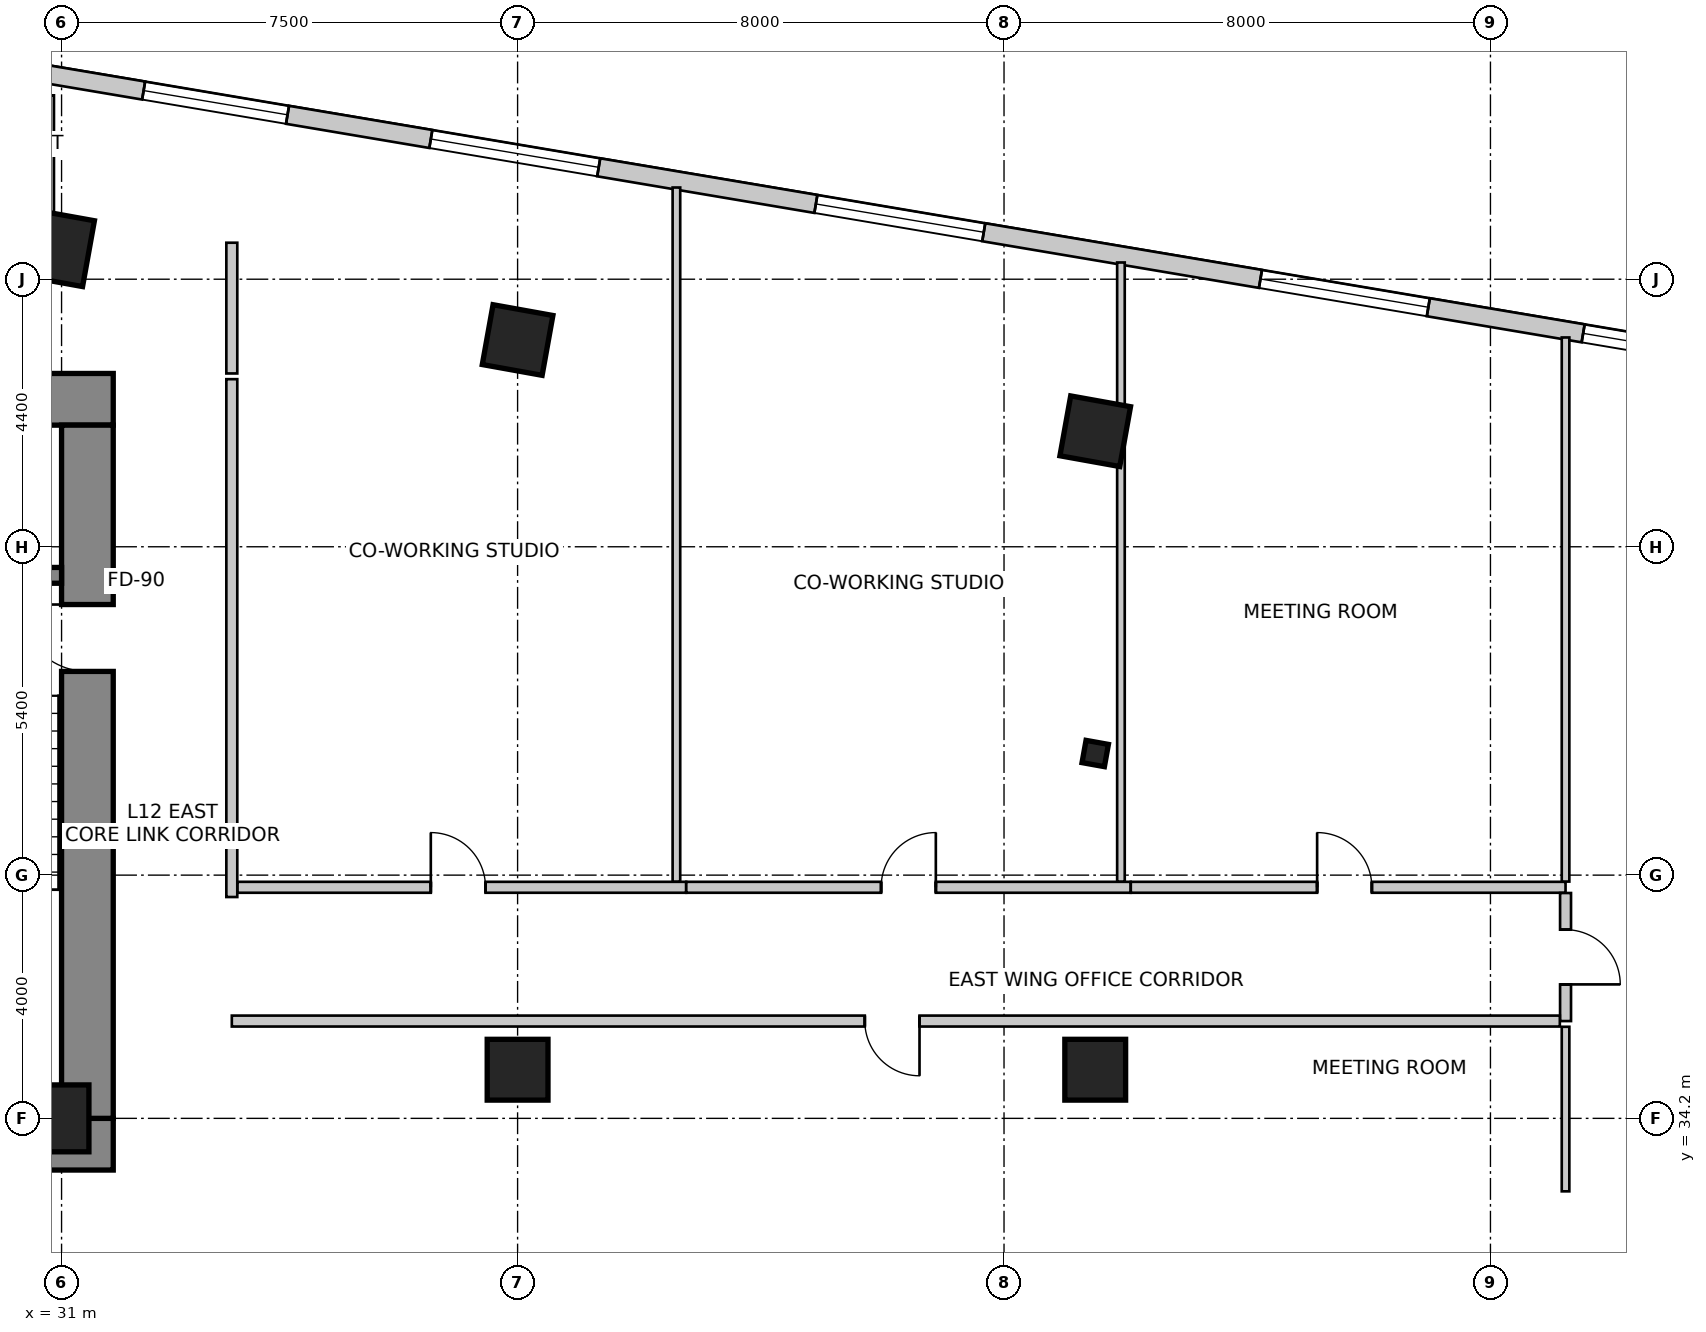
"""IFC4 building model, lengths in metres.
Left out: names, types, materials, properties, quantities, classifications, styles, units other than length and angle.
Written with IfcOpenShell. Run it as: python <this file> out.ifc"""

import sys

from ifc_helpers import new_model, si_unit, direction, frame, frame_2d, origin, origin_2d, place, context, subcontext, project, spatial, rectangle, i_section, extrude, source, transform, mapped, element, fill, save


model = new_model("IFC4")
c1 = context("Model", 3, precision=1e-05, world=origin(), true_north=direction((0.0, 1.0)))
c2 = subcontext(c1, "Body", "Model", "MODEL_VIEW")
j1 = project(units=[si_unit("LENGTHUNIT", "METRE"), si_unit("PLANEANGLEUNIT", "RADIAN")], contexts=[c1])
p1 = place(None, origin())
s1 = spatial("IfcSite", under=j1, at=p1, CompositionType="ELEMENT")
p2 = place(p1, origin())
s2 = spatial("IfcBuilding", under=s1, at=p2, CompositionType="ELEMENT")
p3 = place(p2, frame((0.0, 0.0, 51.0)))
s3 = spatial("IfcBuildingStorey", under=s2, at=p3, CompositionType="ELEMENT", Elevation=51.0)
p4 = place(p3, frame((15.75, 46.025, 0.0), z_axis=(0.0, 0.0, 1.0), x_axis=(1.0, 0.0, 0.0)))
e1 = element("IfcWall", 1, at=p4, inside=s3, PredefinedType="SHEAR", context=c2, shape_type="SweptSolid", body=[
    extrude(rectangle(XDim=16.1, YDim=0.85, at=frame_2d((8.05, 0.0))), origin(), (0.0, 0.0, 1.0), 4.0),
])
p5 = place(p3, frame((15.75, 33.775, 0.0), z_axis=(0.0, 0.0, 1.0), x_axis=(1.0, 0.0, 0.0)))
e2 = element("IfcWall", 2, at=p5, inside=s3, PredefinedType="SHEAR", context=c2, shape_type="SweptSolid", body=[
    extrude(rectangle(XDim=16.1, YDim=0.85, at=frame_2d((8.05, 0.0))), origin(), (0.0, 0.0, 1.0), 4.0),
])
m1 = source(origin(), c2, "Body", "SweptSolid", [
    extrude(rectangle(XDim=1.3, YDim=2.15, at=frame_2d((0.65, 1.075))), frame((0.0, 0.435, 0.0), z_axis=(0.0, -1.0, 0.0), x_axis=(1.0, 0.0, 0.0)), (0.0, 0.0, 1.0), 0.87),
])
p6 = place(p5, frame((10.18, 0.0, 0.0)))
e3 = element("IfcOpeningElement", 3, at=p6, cuts=e2, PredefinedType="OPENING", context=c2, shape_type="MappedRepresentation", body=[
    mapped(m1, transform((0.0, 0.0, 0.0), scale=1.0)),
])
p7 = place(p3, frame((31.425, 34.2, 0.0), z_axis=(0.0, 0.0, 1.0), x_axis=(0.0, 1.0, 0.0)))
e4 = element("IfcWall", 4, at=p7, inside=s3, PredefinedType="SHEAR", context=c2, shape_type="SweptSolid", body=[
    extrude(rectangle(XDim=11.4, YDim=0.85, at=frame_2d((5.7, 0.0))), origin(), (0.0, 0.0, 1.0), 4.0),
])
m2 = source(origin(), c2, "Body", "SweptSolid", [
    extrude(rectangle(XDim=1.1, YDim=2.15, at=frame_2d((0.55, 1.075))), frame((0.0, 0.435, 0.0), z_axis=(0.0, -1.0, 0.0), x_axis=(1.0, 0.0, 0.0)), (0.0, 0.0, 1.0), 0.87),
])
p8 = place(p7, frame((7.35, 0.0, 0.0)))
e5 = element("IfcOpeningElement", 5, at=p8, cuts=e4, PredefinedType="OPENING", context=c2, shape_type="MappedRepresentation", body=[
    mapped(m2, transform((0.0, 0.0, 0.0), scale=1.0)),
])
p9 = place(p3, frame((27.5, 43.13, 0.0), z_axis=(0.0, 0.0, 1.0), x_axis=(1.0, 0.0, 0.0)))
e6 = element("IfcWall", 6, at=p9, inside=s3, PredefinedType="SHEAR", context=c2, shape_type="SweptSolid", body=[
    extrude(rectangle(XDim=3.5, YDim=0.26, at=frame_2d((1.75, 0.0))), origin(), (0.0, 0.0, 1.0), 4.0),
])
m3 = source(origin(), c2, "Body", "SweptSolid", [
    extrude(rectangle(XDim=0.9, YDim=1.1, at=origin_2d()), origin(), (0.0, 0.0, 1.0), 4.0),
])
p10 = place(p3, frame((31.0, 48.5, 0.0), z_axis=(0.0, 0.0, 1.0), x_axis=(0.984195607969, -0.17708474032, 0.0)))
e7 = element("IfcColumn", 7, at=p10, inside=s3, PredefinedType="COLUMN", context=c2, shape_type="MappedRepresentation", body=[
    mapped(m3, transform((0.0, 0.0, 0.0), scale=1.0)),
])
m4 = source(origin(), c2, "Body", "SweptSolid", [
    extrude(rectangle(XDim=1.0, YDim=1.0, at=origin_2d()), origin(), (0.0, 0.0, 1.0), 4.0),
])
for number, where, z_axis, x_axis in (
    (8, (38.5, 47.0, 0.0), (0.0, 0.0, 1.0), (0.984, -0.177, 0.0)),
    (9, (48.0, 45.5, 0.0), (0.0, 0.0, 1.0), (0.984, -0.177, 0.0)),
):
    element("IfcColumn", number, at=place(p3, frame(where, z_axis=z_axis, x_axis=x_axis)), inside=s3, PredefinedType="COLUMN", context=c2, shape_type="MappedRepresentation", body=[
        mapped(m4, transform((0.0, 0.0, 0.0), scale=1.0)),
    ])
p11 = place(p3, frame((31.0, 34.2, 0.0), z_axis=(0.0, 0.0, 1.0), x_axis=(1.0, 0.0, 0.0)))
e10 = element("IfcColumn", 10, at=p11, inside=s3, PredefinedType="COLUMN", context=c2, shape_type="MappedRepresentation", body=[
    mapped(m3, transform((0.0, 0.0, 0.0), scale=1.0)),
])
for number, where, z_axis, x_axis in (
    (11, (38.5, 35.0, 0.0), (0.0, 0.0, 1.0), (1.0, 0.0, 0.0)),
    (12, (48.0, 35.0, 0.0), (0.0, 0.0, 1.0), (1.0, 0.0, 0.0)),
):
    element("IfcColumn", number, at=place(p3, frame(where, z_axis=z_axis, x_axis=x_axis)), inside=s3, PredefinedType="COLUMN", context=c2, shape_type="MappedRepresentation", body=[
        mapped(m4, transform((0.0, 0.0, 0.0), scale=1.0)),
    ])
m5 = source(origin(), c2, "Body", "SweptSolid", [
    extrude(i_section(OverallWidth=0.374, OverallDepth=0.372, WebThickness=0.016, FlangeThickness=0.026, FilletRadius=0.015, at=origin_2d()), origin(), (0.0, 0.0, 1.0), 4.0),
])
p12 = place(p3, frame((48.0, 40.2, 0.0), z_axis=(0.0, 0.0, 1.0), x_axis=(0.984195607969, -0.17708474032, 0.0)))
e13 = element("IfcColumn", 13, at=p12, inside=s3, PredefinedType="COLUMN", context=c2, shape_type="MappedRepresentation", body=[
    mapped(m5, transform((0.0, 0.0, 0.0), scale=1.0)),
])
p13 = place(p3, frame((58.761, 46.648, 0.0), z_axis=(0.0, 0.0, 1.0), x_axis=(-0.98607502735, 0.166301053624, 0.0)))
e14 = element("IfcWall", 14, at=p13, inside=s3, PredefinedType="SOLIDWALL", context=c2, shape_type="SweptSolid", body=[
    extrude(rectangle(XDim=37.397, YDim=0.3, at=frame_2d((18.699, 0.0))), origin(), (0.0, 0.0, 1.0), 3.75),
])
m6 = source(origin(), c2, "Body", "SweptSolid", [
    extrude(rectangle(XDim=2.4, YDim=2.2, at=frame_2d((1.2, 1.1))), frame((0.0, 0.16, 0.0), z_axis=(0.0, -1.0, 0.0), x_axis=(1.0, 0.0, 0.0)), (0.0, 0.0, 1.0), 0.32),
])
p14 = place(p13, frame((0.375, 0.0, 0.85)))
e15 = element("IfcOpeningElement", 15, at=p14, cuts=e14, PredefinedType="OPENING", context=c2, shape_type="MappedRepresentation", body=[
    mapped(m6, transform((0.0, 0.0, 0.0), scale=1.0)),
])
m7 = source(origin(), c2, "Body", "SweptSolid", [
    extrude(rectangle(XDim=2.8, YDim=2.4, at=frame_2d((1.4, 1.2))), frame((0.0, 0.16, 0.0), z_axis=(0.0, -1.0, 0.0), x_axis=(1.0, 0.0, 0.0)), (0.0, 0.0, 1.0), 0.32),
])
p15 = place(p13, frame((5.357, 0.0, 0.85)))
e16 = element("IfcOpeningElement", 16, at=p15, cuts=e14, PredefinedType="OPENING", context=c2, shape_type="MappedRepresentation", body=[
    mapped(m7, transform((0.0, 0.0, 0.0), scale=1.0)),
])
p16 = place(p13, frame((12.772, 0.0, 0.85)))
e17 = element("IfcOpeningElement", 17, at=p16, cuts=e14, PredefinedType="OPENING", context=c2, shape_type="MappedRepresentation", body=[
    mapped(m7, transform((0.0, 0.0, 0.0), scale=1.0)),
])
p17 = place(p13, frame((19.194, 0.0, 0.85)))
e18 = element("IfcOpeningElement", 18, at=p17, cuts=e14, PredefinedType="OPENING", context=c2, shape_type="MappedRepresentation", body=[
    mapped(m7, transform((0.0, 0.0, 0.0), scale=1.0)),
])
p18 = place(p13, frame((24.384, 0.0, 0.85)))
e19 = element("IfcOpeningElement", 19, at=p18, cuts=e14, PredefinedType="OPENING", context=c2, shape_type="MappedRepresentation", body=[
    mapped(m6, transform((0.0, 0.0, 0.0), scale=1.0)),
])
p19 = place(p13, frame((29.757, 0.0, 0.85)))
e20 = element("IfcOpeningElement", 20, at=p19, cuts=e14, PredefinedType="OPENING", context=c2, shape_type="MappedRepresentation", body=[
    mapped(m7, transform((0.0, 0.0, 0.0), scale=1.0)),
])
p20 = place(p13, frame((34.256, 0.0, 0.85)))
e21 = element("IfcOpeningElement", 21, at=p20, cuts=e14, PredefinedType="OPENING", context=c2, shape_type="MappedRepresentation", body=[
    mapped(m7, transform((0.0, 0.0, 0.0), scale=1.0)),
])
p21 = place(p3, frame((25.362, 48.6, 0.0), z_axis=(0.0, 0.0, 1.0), x_axis=(1.0, 0.0, 0.0)))
e22 = element("IfcWall", 22, at=p21, inside=s3, PredefinedType="PARTITIONING", context=c2, shape_type="SweptSolid", body=[
    extrude(rectangle(XDim=5.598, YDim=0.18, at=frame_2d((2.799, 0.0))), origin(), (0.0, 0.0, 1.0), 2.892),
])
m8 = source(origin(), c2, "Body", "SweptSolid", [
    extrude(rectangle(XDim=0.9, YDim=2.15, at=frame_2d((0.45, 1.075))), frame((0.0, 0.1, 0.0), z_axis=(0.0, -1.0, 0.0), x_axis=(1.0, 0.0, 0.0)), (0.0, 0.0, 1.0), 0.2),
])
p22 = place(p21, frame((2.349, 0.0, 0.0)))
e23 = element("IfcOpeningElement", 23, at=p22, cuts=e22, PredefinedType="OPENING", context=c2, shape_type="MappedRepresentation", body=[
    mapped(m8, transform((0.0, 0.0, 0.0), scale=1.0)),
])
p23 = place(p3, frame((33.8, 48.6, 0.0), z_axis=(0.0, 0.0, 1.0), x_axis=(0.0, -1.0, 0.0)))
e24 = element("IfcWall", 24, at=p23, inside=s3, PredefinedType="PARTITIONING", context=c2, shape_type="SweptSolid", body=[
    extrude(rectangle(XDim=2.15, YDim=0.18, at=frame_2d((1.075, 0.0))), origin(), (0.0, 0.0, 1.0), 2.892),
])
p24 = place(p3, frame((33.8, 46.356, 0.0), z_axis=(0.0, 0.0, 1.0), x_axis=(0.0, -1.0, 0.0)))
e25 = element("IfcWall", 25, at=p24, inside=s3, PredefinedType="PARTITIONING", context=c2, shape_type="SweptSolid", body=[
    extrude(rectangle(XDim=8.516, YDim=0.18, at=frame_2d((4.258, 0.0))), origin(), (0.0, 0.0, 1.0), 3.188),
])
p25 = place(p3, frame((33.894, 38.0, 0.0), z_axis=(0.0, 0.0, 1.0), x_axis=(1.0, 0.0, 0.0)))
e26 = element("IfcWall", 26, at=p25, inside=s3, PredefinedType="PARTITIONING", context=c2, shape_type="SweptSolid", body=[
    extrude(rectangle(XDim=7.378, YDim=0.18, at=frame_2d((3.689, 0.0))), origin(), (0.0, 0.0, 1.0), 3.125),
])
p26 = place(p25, frame((3.179, 0.0, 0.0)))
e27 = element("IfcOpeningElement", 27, at=p26, cuts=e26, PredefinedType="OPENING", context=c2, shape_type="MappedRepresentation", body=[
    mapped(m8, transform((0.0, 0.0, 0.0), scale=1.0)),
])
p27 = place(p3, frame((41.274, 38.0, 0.0), z_axis=(0.0, 0.0, 1.0), x_axis=(1.0, 0.0, 0.0)))
e28 = element("IfcWall", 28, at=p27, inside=s3, PredefinedType="PARTITIONING", context=c2, shape_type="SweptSolid", body=[
    extrude(rectangle(XDim=7.309, YDim=0.18, at=frame_2d((3.655, 0.0))), origin(), (0.0, 0.0, 1.0), 3.125),
])
p28 = place(p27, frame((3.205, 0.0, 0.0)))
e29 = element("IfcOpeningElement", 29, at=p28, cuts=e28, PredefinedType="OPENING", context=c2, shape_type="MappedRepresentation", body=[
    mapped(m8, transform((0.0, 0.0, 0.0), scale=1.0)),
])
p29 = place(p3, frame((48.585, 38.0, 0.0), z_axis=(0.0, 0.0, 1.0), x_axis=(1.0, 0.0, 0.0)))
e30 = element("IfcWall", 30, at=p29, inside=s3, PredefinedType="PARTITIONING", context=c2, shape_type="SweptSolid", body=[
    extrude(rectangle(XDim=7.15, YDim=0.18, at=frame_2d((3.575, 0.0))), origin(), (0.0, 0.0, 1.0), 3.75),
])
p30 = place(p29, frame((3.064, 0.0, 0.0)))
e31 = element("IfcOpeningElement", 31, at=p30, cuts=e30, PredefinedType="OPENING", context=c2, shape_type="MappedRepresentation", body=[
    mapped(m8, transform((0.0, 0.0, 0.0), scale=1.0)),
])
p31 = place(p3, frame((55.735, 37.906, 0.0), z_axis=(0.0, 0.0, 1.0), x_axis=(0.0, -1.0, 0.0)))
e32 = element("IfcWall", 32, at=p31, inside=s3, PredefinedType="PARTITIONING", context=c2, shape_type="SweptSolid", body=[
    extrude(rectangle(XDim=2.106, YDim=0.18, at=frame_2d((1.053, 0.0))), origin(), (0.0, 0.0, 1.0), 3.75),
])
p32 = place(p31, frame((0.603, 0.0, 0.0)))
e33 = element("IfcOpeningElement", 33, at=p32, cuts=e32, PredefinedType="OPENING", context=c2, shape_type="MappedRepresentation", body=[
    mapped(m8, transform((0.0, 0.0, 0.0), scale=1.0)),
])
p33 = place(p3, frame((55.641, 35.8, 0.0), z_axis=(0.0, 0.0, 1.0), x_axis=(-1.0, 0.0, 0.0)))
e34 = element("IfcWall", 34, at=p33, inside=s3, PredefinedType="PARTITIONING", context=c2, shape_type="SweptSolid", body=[
    extrude(rectangle(XDim=21.841, YDim=0.18, at=frame_2d((10.92, 0.0))), origin(), (0.0, 0.0, 1.0), 3.125),
])
p34 = place(p33, frame((10.531, 0.0, 0.0)))
e35 = element("IfcOpeningElement", 35, at=p34, cuts=e34, PredefinedType="OPENING", context=c2, shape_type="MappedRepresentation", body=[
    mapped(m8, transform((0.0, 0.0, 0.0), scale=1.0)),
])
p35 = place(p3, frame((41.112, 49.508, 0.0), z_axis=(0.0, 0.0, 1.0), x_axis=(0.0, -1.0, 0.0)))
e36 = element("IfcWall", 36, at=p35, inside=s3, PredefinedType="PARTITIONING", context=c2, shape_type="SweptSolid", body=[
    extrude(rectangle(XDim=11.414, YDim=0.125, at=frame_2d((5.707, 0.0))), origin(), (0.0, 0.0, 1.0), 2.892),
])
p36 = place(p3, frame((48.423, 48.275, 0.0), z_axis=(0.0, 0.0, 1.0), x_axis=(0.0, -1.0, 0.0)))
e37 = element("IfcWall", 37, at=p36, inside=s3, PredefinedType="PARTITIONING", context=c2, shape_type="SweptSolid", body=[
    extrude(rectangle(XDim=10.181, YDim=0.125, at=frame_2d((5.091, 0.0))), origin(), (0.0, 0.0, 1.0), 3.75),
])
p37 = place(p3, frame((55.735, 47.042, 0.0), z_axis=(0.0, 0.0, 1.0), x_axis=(0.0, -1.0, 0.0)))
e38 = element("IfcWall", 38, at=p37, inside=s3, PredefinedType="PARTITIONING", context=c2, shape_type="SweptSolid", body=[
    extrude(rectangle(XDim=8.948, YDim=0.125, at=frame_2d((4.474, 0.0))), origin(), (0.0, 0.0, 1.0), 3.75),
])
p38 = place(p3, frame((55.735, 33.0, 0.0), z_axis=(0.0, 0.0, 1.0), x_axis=(0.0, 1.0, 0.0)))
e39 = element("IfcWall", 39, at=p38, inside=s3, PredefinedType="PARTITIONING", context=c2, shape_type="SweptSolid", body=[
    extrude(rectangle(XDim=2.706, YDim=0.125, at=frame_2d((1.353, 0.0))), origin(), (0.0, 0.0, 1.0), 3.75),
])
p39 = place(p3, frame((30.8, 51.024, 0.0), z_axis=(0.0, 0.0, 1.0), x_axis=(0.0, -1.0, 0.0)))
e40 = element("IfcWall", 40, at=p39, inside=s3, PredefinedType="PARTITIONING", context=c2, shape_type="SweptSolid", body=[
    extrude(rectangle(XDim=2.204, YDim=0.15, at=frame_2d((1.102, 0.0))), origin(), (0.0, 0.0, 1.0), 3.75),
])
m9 = source(origin(), c2, "Body", "SweptSolid", [
    extrude(rectangle(XDim=2.4, YDim=2.2, at=frame_2d((1.2, 1.1))), frame((0.0, -0.015, 0.0), z_axis=(0.0, -1.0, 0.0), x_axis=(1.0, 0.0, 0.0)), (0.0, 0.0, 1.0), 0.06),
])
p40 = place(p14, origin())
e41 = element("IfcWindow", 41, at=p40, inside=s3, PartitioningType="SINGLE_PANEL", PredefinedType="WINDOW", context=c2, shape_type="MappedRepresentation", body=[
    mapped(m9, transform((0.0, 0.0, 0.0), scale=1.0)),
])
fill(e15, e41)
m10 = source(origin(), c2, "Body", "SweptSolid", [
    extrude(rectangle(XDim=2.8, YDim=2.4, at=frame_2d((1.4, 1.2))), frame((0.0, -0.015, 0.0), z_axis=(0.0, -1.0, 0.0), x_axis=(1.0, 0.0, 0.0)), (0.0, 0.0, 1.0), 0.06),
])
p41 = place(p15, origin())
e42 = element("IfcWindow", 42, at=p41, inside=s3, PartitioningType="SINGLE_PANEL", PredefinedType="WINDOW", context=c2, shape_type="MappedRepresentation", body=[
    mapped(m10, transform((0.0, 0.0, 0.0), scale=1.0)),
])
fill(e16, e42)
p42 = place(p16, origin())
e43 = element("IfcWindow", 43, at=p42, inside=s3, PartitioningType="SINGLE_PANEL", PredefinedType="WINDOW", context=c2, shape_type="MappedRepresentation", body=[
    mapped(m10, transform((0.0, 0.0, 0.0), scale=1.0)),
])
fill(e17, e43)
p43 = place(p17, origin())
e44 = element("IfcWindow", 44, at=p43, inside=s3, PartitioningType="SINGLE_PANEL", PredefinedType="WINDOW", context=c2, shape_type="MappedRepresentation", body=[
    mapped(m10, transform((0.0, 0.0, 0.0), scale=1.0)),
])
fill(e18, e44)
p44 = place(p18, origin())
e45 = element("IfcWindow", 45, at=p44, inside=s3, PartitioningType="SINGLE_PANEL", PredefinedType="WINDOW", context=c2, shape_type="MappedRepresentation", body=[
    mapped(m9, transform((0.0, 0.0, 0.0), scale=1.0)),
])
fill(e19, e45)
m11 = source(origin(), c2, "Body", "SweptSolid", [
    extrude(rectangle(XDim=1.1, YDim=2.15, at=frame_2d((0.55, 1.075))), frame((0.0, 0.025, 0.0), z_axis=(0.0, -1.0, 0.0), x_axis=(1.0, 0.0, 0.0)), (0.0, 0.0, 1.0), 0.05),
])
p45 = place(p8, origin())
e46 = element("IfcDoor", 46, at=p45, inside=s3, OperationType="SINGLE_SWING_RIGHT", PredefinedType="DOOR", context=c2, shape_type="MappedRepresentation", body=[
    mapped(m11, transform((0.0, 0.0, 0.0), scale=1.0)),
])
fill(e5, e46)
m12 = source(origin(), c2, "Body", "SweptSolid", [
    extrude(rectangle(XDim=0.9, YDim=2.15, at=frame_2d((0.45, 1.075))), frame((0.0, 0.025, 0.0), z_axis=(0.0, -1.0, 0.0), x_axis=(1.0, 0.0, 0.0)), (0.0, 0.0, 1.0), 0.05),
])
p46 = place(p26, origin())
e47 = element("IfcDoor", 47, at=p46, inside=s3, OperationType="SINGLE_SWING_LEFT", PredefinedType="DOOR", context=c2, shape_type="MappedRepresentation", body=[
    mapped(m12, transform((0.0, 0.0, 0.0), scale=1.0)),
])
fill(e27, e47)
p47 = place(p28, origin())
e48 = element("IfcDoor", 48, at=p47, inside=s3, OperationType="SINGLE_SWING_RIGHT", PredefinedType="DOOR", context=c2, shape_type="MappedRepresentation", body=[
    mapped(m12, transform((0.0, 0.0, 0.0), scale=1.0)),
])
fill(e29, e48)
p48 = place(p30, origin())
e49 = element("IfcDoor", 49, at=p48, inside=s3, OperationType="SINGLE_SWING_LEFT", PredefinedType="DOOR", context=c2, shape_type="MappedRepresentation", body=[
    mapped(m12, transform((0.0, 0.0, 0.0), scale=1.0)),
])
fill(e31, e49)
p49 = place(p32, origin())
e50 = element("IfcDoor", 50, at=p49, inside=s3, OperationType="SINGLE_SWING_RIGHT", PredefinedType="DOOR", context=c2, shape_type="MappedRepresentation", body=[
    mapped(m12, transform((0.0, 0.0, 0.0), scale=1.0)),
])
fill(e33, e50)
p50 = place(p34, origin())
e51 = element("IfcDoor", 51, at=p50, inside=s3, OperationType="SINGLE_SWING_LEFT", PredefinedType="DOOR", context=c2, shape_type="MappedRepresentation", body=[
    mapped(m12, transform((0.0, 0.0, 0.0), scale=1.0)),
])
fill(e35, e51)
save(model, sys.argv[1])
